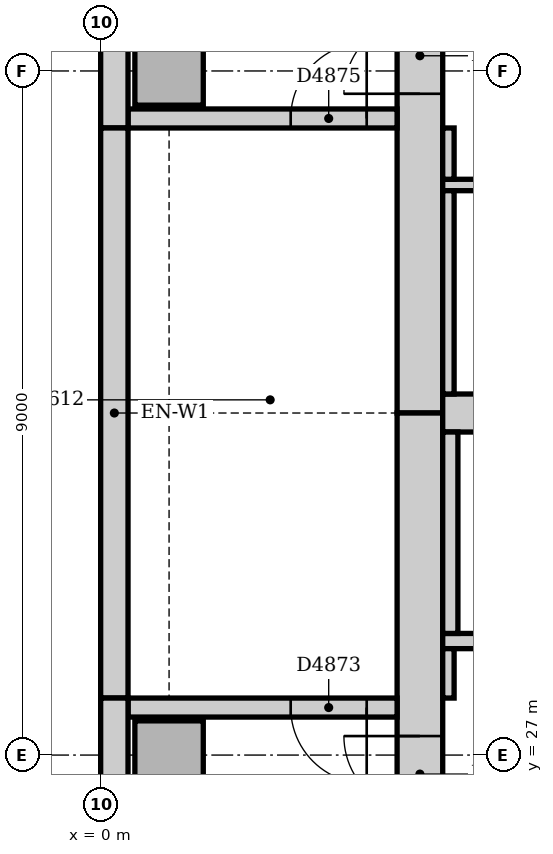
"""IFC4 building model, lengths in metres.
Left out: names, types, materials, properties, quantities, classifications, styles, units other than length and angle.
Written with IfcOpenShell. Run it as: python <this file> out.ifc"""

import sys

from ifc_helpers import new_model, si_unit, direction, frame, frame_2d, origin, origin_2d, place, context, subcontext, project, spatial, rectangle, extrude, element, fill, save


model = new_model("IFC4")
c1 = context("Model", 3, precision=1e-05, world=origin(), true_north=direction((0.0, 1.0)))
c2 = subcontext(c1, "Body", "Model", "MODEL_VIEW")
j1 = project(units=[si_unit("LENGTHUNIT", "METRE"), si_unit("PLANEANGLEUNIT", "RADIAN")], contexts=[c1])
p1 = place(None, origin())
s1 = spatial("IfcSite", under=j1, at=p1, CompositionType="ELEMENT")
p2 = place(p1, origin())
s2 = spatial("IfcBuilding", under=s1, at=p2, CompositionType="ELEMENT")
p3 = place(p2, frame((0.0, 0.0, 193.0)))
s3 = spatial("IfcBuildingStorey", under=s2, at=p3, CompositionType="ELEMENT", Elevation=193.0)
p4 = place(p3, frame((4.2, 42.0, 0.0), z_axis=(0.0, 0.0, 1.0), x_axis=(0.0, -1.0, 0.0)))
e1 = element("IfcWall", 1, at=p4, inside=s3, PredefinedType="SOLIDWALL", context=c2, shape_type="SweptSolid", body=[
    extrude(rectangle(XDim=10.5, YDim=0.6, at=frame_2d((5.25, 0.0))), origin(), (0.0, 0.0, 1.0), 5.0),
])
p5 = place(p4, frame((5.3, 0.0, 0.0)))
e2 = element("IfcOpeningElement", 2, at=p5, cuts=e1, PredefinedType="OPENING", context=c2, shape_type="SweptSolid", body=[
    extrude(rectangle(XDim=1.0, YDim=2.1, at=frame_2d((0.5, 1.05))), frame((0.0, 0.31, 0.0), z_axis=(0.0, -1.0, 0.0), x_axis=(1.0, 0.0, 0.0)), (0.0, 0.0, 1.0), 0.62),
])
p6 = place(p3, frame((4.2, 31.5, 0.0), z_axis=(0.0, 0.0, 1.0), x_axis=(0.0, -1.0, 0.0)))
e3 = element("IfcWall", 3, at=p6, inside=s3, PredefinedType="SOLIDWALL", context=c2, shape_type="SweptSolid", body=[
    extrude(rectangle(XDim=10.5, YDim=0.6, at=frame_2d((5.25, 0.0))), origin(), (0.0, 0.0, 1.0), 5.0),
])
p7 = place(p6, frame((4.25, 0.0, 0.0)))
e4 = element("IfcOpeningElement", 4, at=p7, cuts=e3, PredefinedType="OPENING", context=c2, shape_type="SweptSolid", body=[
    extrude(rectangle(XDim=1.0, YDim=2.1, at=frame_2d((0.5, 1.05))), frame((0.0, 0.31, 0.0), z_axis=(0.0, -1.0, 0.0), x_axis=(1.0, 0.0, 0.0)), (0.0, 0.0, 1.0), 0.62),
])
p8 = place(p3, frame((4.5, 31.5, 0.0), z_axis=(0.0, 0.0, 1.0), x_axis=(1.0, 0.0, 0.0)))
e5 = element("IfcWall", 5, at=p8, inside=s3, PredefinedType="SOLIDWALL", context=c2, shape_type="SweptSolid", body=[
    extrude(rectangle(XDim=18.0, YDim=0.5, at=frame_2d((9.0, 0.0))), origin(), (0.0, 0.0, 1.0), 5.0),
])
p9 = place(p3, frame((3.9, 27.625, 0.0), z_axis=(0.0, 0.0, 1.0), x_axis=(-1.0, 0.0, 0.0)))
e6 = element("IfcWall", 6, at=p9, inside=s3, PredefinedType="SOLIDWALL", context=c2, shape_type="SweptSolid", body=[
    extrude(rectangle(XDim=3.54, YDim=0.25, at=frame_2d((1.77, 0.0))), origin(), (0.0, 0.0, 1.0), 5.0),
])
p10 = place(p9, frame((0.4, 0.0, 0.0)))
e7 = element("IfcOpeningElement", 7, at=p10, cuts=e6, PredefinedType="OPENING", context=c2, shape_type="SweptSolid", body=[
    extrude(rectangle(XDim=1.0, YDim=2.1, at=frame_2d((0.5, 1.05))), frame((0.0, 0.135, 0.0), z_axis=(0.0, -1.0, 0.0), x_axis=(1.0, 0.0, 0.0)), (0.0, 0.0, 1.0), 0.27),
])
p11 = place(p3, frame((0.36, 35.375, 0.0), z_axis=(0.0, 0.0, 1.0), x_axis=(1.0, 0.0, 0.0)))
e8 = element("IfcWall", 8, at=p11, inside=s3, PredefinedType="SOLIDWALL", context=c2, shape_type="SweptSolid", body=[
    extrude(rectangle(XDim=3.54, YDim=0.25, at=frame_2d((1.77, 0.0))), origin(), (0.0, 0.0, 1.0), 5.0),
])
p12 = place(p11, frame((2.14, 0.0, 0.0)))
e9 = element("IfcOpeningElement", 9, at=p12, cuts=e8, PredefinedType="OPENING", context=c2, shape_type="SweptSolid", body=[
    extrude(rectangle(XDim=1.0, YDim=2.1, at=frame_2d((0.5, 1.05))), frame((0.0, 0.135, 0.0), z_axis=(0.0, -1.0, 0.0), x_axis=(1.0, 0.0, 0.0)), (0.0, 0.0, 1.0), 0.27),
])
for number, where, z_axis, x_axis in (
    (10, (0.9, 27.0, 0.0), (0.0, 0.0, 1.0), (1.0, 0.0, 0.0)),
    (11, (0.9, 36.0, 0.0), (0.0, 0.0, 1.0), (1.0, 0.0, 0.0)),
):
    element("IfcColumn", number, at=place(p3, frame(where, z_axis=z_axis, x_axis=x_axis)), inside=s3, PredefinedType="COLUMN", context=c2, shape_type="SweptSolid", body=[
        extrude(rectangle(XDim=0.9, YDim=0.9, at=origin_2d()), origin(), (0.0, 0.0, 1.0), 5.0),
    ])
p13 = place(p3, frame((0.18, 42.0, 0.0), z_axis=(0.0, 0.0, 1.0), x_axis=(0.0, -1.0, 0.0)))
e12 = element("IfcWall", 12, at=p13, inside=s3, PredefinedType="STANDARD", context=c2, shape_type="SweptSolid", body=[
    extrude(rectangle(XDim=6.75, YDim=0.36, at=frame_2d((3.375, 0.0))), origin(), (0.0, 0.0, 1.0), 4.85),
])
p14 = place(p3, frame((0.18, 35.25, 0.0), z_axis=(0.0, 0.0, 1.0), x_axis=(0.0, -1.0, 0.0)))
e13 = element("IfcWall", 13, at=p14, inside=s3, PredefinedType="STANDARD", context=c2, shape_type="SweptSolid", body=[
    extrude(rectangle(XDim=7.5, YDim=0.36, at=frame_2d((3.75, 0.0))), origin(), (0.0, 0.0, 1.0), 4.85),
])
p15 = place(p3, frame((0.18, 27.75, 0.0), z_axis=(0.0, 0.0, 1.0), x_axis=(0.0, -1.0, 0.0)))
e14 = element("IfcWall", 14, at=p15, inside=s3, PredefinedType="STANDARD", context=c2, shape_type="SweptSolid", body=[
    extrude(rectangle(XDim=6.75, YDim=0.36, at=frame_2d((3.375, 0.0))), origin(), (0.0, 0.0, 1.0), 4.85),
])
p16 = place(p3, frame((4.5, 28.5, 0.0), z_axis=(0.0, 0.0, 1.0), x_axis=(1.0, 0.0, 0.0)))
e15 = element("IfcWall", 15, at=p16, inside=s3, PredefinedType="PARTITIONING", context=c2, shape_type="SweptSolid", body=[
    extrude(rectangle(XDim=18.0, YDim=0.2, at=frame_2d((9.0, 0.0))), origin(), (0.0, 0.0, 1.0), 4.85),
])
p17 = place(p16, frame((0.95, 0.0, 0.0)))
e16 = element("IfcOpeningElement", 16, at=p17, cuts=e15, PredefinedType="OPENING", context=c2, shape_type="SweptSolid", body=[
    extrude(rectangle(XDim=1.1, YDim=2.1, at=frame_2d((0.55, 1.05))), frame((0.0, 0.11, 0.0), z_axis=(0.0, -1.0, 0.0), x_axis=(1.0, 0.0, 0.0)), (0.0, 0.0, 1.0), 0.22),
])
p18 = place(p16, frame((3.95, 0.0, 0.0)))
e17 = element("IfcOpeningElement", 17, at=p18, cuts=e15, PredefinedType="OPENING", context=c2, shape_type="SweptSolid", body=[
    extrude(rectangle(XDim=1.1, YDim=2.1, at=frame_2d((0.55, 1.05))), frame((0.0, 0.11, 0.0), z_axis=(0.0, -1.0, 0.0), x_axis=(1.0, 0.0, 0.0)), (0.0, 0.0, 1.0), 0.22),
])
p19 = place(p16, frame((6.95, 0.0, 0.0)))
e18 = element("IfcOpeningElement", 18, at=p19, cuts=e15, PredefinedType="OPENING", context=c2, shape_type="SweptSolid", body=[
    extrude(rectangle(XDim=1.1, YDim=2.1, at=frame_2d((0.55, 1.05))), frame((0.0, 0.11, 0.0), z_axis=(0.0, -1.0, 0.0), x_axis=(1.0, 0.0, 0.0)), (0.0, 0.0, 1.0), 0.22),
])
p20 = place(p16, frame((9.95, 0.0, 0.0)))
e19 = element("IfcOpeningElement", 19, at=p20, cuts=e15, PredefinedType="OPENING", context=c2, shape_type="SweptSolid", body=[
    extrude(rectangle(XDim=1.1, YDim=2.1, at=frame_2d((0.55, 1.05))), frame((0.0, 0.11, 0.0), z_axis=(0.0, -1.0, 0.0), x_axis=(1.0, 0.0, 0.0)), (0.0, 0.0, 1.0), 0.22),
])
p21 = place(p16, frame((12.95, 0.0, 0.0)))
e20 = element("IfcOpeningElement", 20, at=p21, cuts=e15, PredefinedType="OPENING", context=c2, shape_type="SweptSolid", body=[
    extrude(rectangle(XDim=1.1, YDim=2.1, at=frame_2d((0.55, 1.05))), frame((0.0, 0.11, 0.0), z_axis=(0.0, -1.0, 0.0), x_axis=(1.0, 0.0, 0.0)), (0.0, 0.0, 1.0), 0.22),
])
p22 = place(p16, frame((15.95, 0.0, 0.0)))
e21 = element("IfcOpeningElement", 21, at=p22, cuts=e15, PredefinedType="OPENING", context=c2, shape_type="SweptSolid", body=[
    extrude(rectangle(XDim=1.1, YDim=2.1, at=frame_2d((0.55, 1.05))), frame((0.0, 0.11, 0.0), z_axis=(0.0, -1.0, 0.0), x_axis=(1.0, 0.0, 0.0)), (0.0, 0.0, 1.0), 0.22),
])
p23 = place(p3, frame((4.6, 28.6, 0.0), z_axis=(0.0, 0.0, 1.0), x_axis=(0.0, 1.0, 0.0)))
e22 = element("IfcWall", 22, at=p23, inside=s3, PredefinedType="PARTITIONING", context=c2, shape_type="SweptSolid", body=[
    extrude(rectangle(XDim=2.65, YDim=0.2, at=frame_2d((1.325, 0.0))), origin(), (0.0, 0.0, 1.0), 4.85),
])
p24 = place(p3, frame((4.5, 34.5, 0.0), z_axis=(0.0, 0.0, 1.0), x_axis=(1.0, 0.0, 0.0)))
e23 = element("IfcWall", 23, at=p24, inside=s3, PredefinedType="PARTITIONING", context=c2, shape_type="SweptSolid", body=[
    extrude(rectangle(XDim=5.9, YDim=0.15, at=frame_2d((2.95, 0.0))), origin(), (0.0, 0.0, 1.0), 4.85),
])
p25 = place(p24, frame((2.5, 0.0, 0.0)))
e24 = element("IfcOpeningElement", 24, at=p25, cuts=e23, PredefinedType="OPENING", context=c2, shape_type="SweptSolid", body=[
    extrude(rectangle(XDim=0.9, YDim=2.1, at=frame_2d((0.45, 1.05))), frame((0.0, 0.085, 0.0), z_axis=(0.0, -1.0, 0.0), x_axis=(1.0, 0.0, 0.0)), (0.0, 0.0, 1.0), 0.17),
])
p26 = place(p3, frame((4.575, 34.575, 0.0), z_axis=(0.0, 0.0, 1.0), x_axis=(0.0, 1.0, 0.0)))
e25 = element("IfcWall", 25, at=p26, inside=s3, PredefinedType="PARTITIONING", context=c2, shape_type="SweptSolid", body=[
    extrude(rectangle(XDim=0.675, YDim=0.15, at=frame_2d((0.338, 0.0))), origin(), (0.0, 0.0, 1.0), 4.85),
])
p27 = place(p3, frame((4.575, 31.75, 0.0), z_axis=(0.0, 0.0, 1.0), x_axis=(0.0, 1.0, 0.0)))
e26 = element("IfcWall", 26, at=p27, inside=s3, PredefinedType="PARTITIONING", context=c2, shape_type="SweptSolid", body=[
    extrude(rectangle(XDim=2.675, YDim=0.15, at=frame_2d((1.337, 0.0))), origin(), (0.0, 0.0, 1.0), 4.85),
])
p28 = place(p3, frame((4.575, 27.75, 0.0), z_axis=(0.0, 0.0, 1.0), x_axis=(0.0, 1.0, 0.0)))
e27 = element("IfcWall", 27, at=p28, inside=s3, PredefinedType="PARTITIONING", context=c2, shape_type="SweptSolid", body=[
    extrude(rectangle(XDim=0.65, YDim=0.15, at=frame_2d((0.325, 0.0))), origin(), (0.0, 0.0, 1.0), 4.85),
])
p29 = place(p7, frame((1.0, 0.0, 0.0), z_axis=(0.0, 0.0, 1.0), x_axis=(-1.0, 0.0, 0.0)))
e28 = element("IfcDoor", 28, at=p29, inside=s3, OperationType="SINGLE_SWING_RIGHT", PredefinedType="DOOR", context=c2, shape_type="SweptSolid", body=[
    extrude(rectangle(XDim=1.0, YDim=2.1, at=frame_2d((0.5, 1.05))), frame((0.0, 0.025, 0.0), z_axis=(0.0, -1.0, 0.0), x_axis=(1.0, 0.0, 0.0)), (0.0, 0.0, 1.0), 0.05),
])
fill(e4, e28)
p30 = place(p10, origin())
e29 = element("IfcDoor", 29, at=p30, inside=s3, OperationType="SINGLE_SWING_LEFT", PredefinedType="DOOR", context=c2, shape_type="SweptSolid", body=[
    extrude(rectangle(XDim=1.0, YDim=2.1, at=frame_2d((0.5, 1.05))), frame((0.0, 0.025, 0.0), z_axis=(0.0, -1.0, 0.0), x_axis=(1.0, 0.0, 0.0)), (0.0, 0.0, 1.0), 0.05),
])
fill(e7, e29)
p31 = place(p5, frame((1.0, 0.0, 0.0), z_axis=(0.0, 0.0, 1.0), x_axis=(-1.0, 0.0, 0.0)))
e30 = element("IfcDoor", 30, at=p31, inside=s3, OperationType="SINGLE_SWING_LEFT", PredefinedType="DOOR", context=c2, shape_type="SweptSolid", body=[
    extrude(rectangle(XDim=1.0, YDim=2.1, at=frame_2d((0.5, 1.05))), frame((0.0, 0.025, 0.0), z_axis=(0.0, -1.0, 0.0), x_axis=(1.0, 0.0, 0.0)), (0.0, 0.0, 1.0), 0.05),
])
fill(e2, e30)
p32 = place(p12, origin())
e31 = element("IfcDoor", 31, at=p32, inside=s3, OperationType="SINGLE_SWING_RIGHT", PredefinedType="DOOR", context=c2, shape_type="SweptSolid", body=[
    extrude(rectangle(XDim=1.0, YDim=2.1, at=frame_2d((0.5, 1.05))), frame((0.0, 0.025, 0.0), z_axis=(0.0, -1.0, 0.0), x_axis=(1.0, 0.0, 0.0)), (0.0, 0.0, 1.0), 0.05),
])
fill(e9, e31)
save(model, sys.argv[1])
